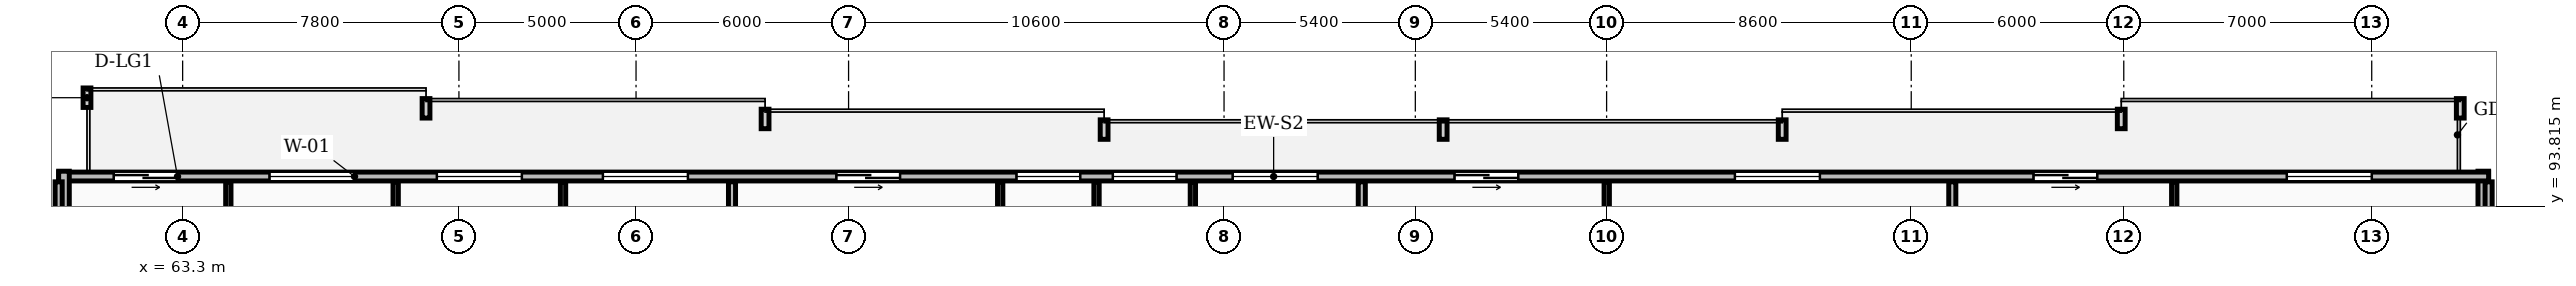
"""IFC4 building model, lengths in metres.
Left out: names, types, materials, properties, quantities, classifications, styles, units other than length and angle.
Written with IfcOpenShell. Run it as: python <this file> out.ifc"""

import sys

from ifc_helpers import new_model, si_unit, direction, frame, frame_2d, origin, place, context, subcontext, project, spatial, rectangle, extrude, element, fill, save


model = new_model("IFC4")
c1 = context("Model", 3, precision=1e-05, world=origin(), true_north=direction((0.0, 1.0)))
c2 = subcontext(c1, "Body", "Model", "MODEL_VIEW")
j1 = project(units=[si_unit("LENGTHUNIT", "METRE"), si_unit("PLANEANGLEUNIT", "RADIAN")], contexts=[c1])
p1 = place(None, origin())
s1 = spatial("IfcSite", under=j1, at=p1, CompositionType="ELEMENT")
p2 = place(p1, origin())
s2 = spatial("IfcBuilding", under=s1, at=p2, CompositionType="ELEMENT")
p3 = place(p2, frame((0.0, 0.0, 256.25)))
s3 = spatial("IfcBuildingStorey", under=s2, at=p3, CompositionType="ELEMENT", Elevation=256.25)
p4 = place(p3, frame((128.25, 91.2, 0.0), z_axis=(0.0, 0.0, 1.0), x_axis=(0.0, 1.0, 0.0)))
e1 = element("IfcWall", 1, at=p4, inside=s3, PredefinedType="STANDARD", context=c2, shape_type="SweptSolid", body=[
    extrude(rectangle(XDim=3.6, YDim=0.3, at=frame_2d((1.8, 0.0))), origin(), (0.0, 0.0, 1.0), 3.17),
])
p5 = place(p3, frame((128.4, 94.65, 0.0), z_axis=(0.0, 0.0, 1.0), x_axis=(-1.0, 0.0, 0.0)))
e2 = element("IfcWall", 2, at=p5, inside=s3, PredefinedType="STANDARD", context=c2, shape_type="SweptSolid", body=[
    extrude(rectangle(XDim=68.6, YDim=0.25, at=frame_2d((34.3, 0.0))), origin(), (0.0, 0.0, 1.0), 3.17),
])
p6 = place(p5, frame((60.248, 0.0, 0.85)))
e3 = element("IfcOpeningElement", 3, at=p6, cuts=e2, PredefinedType="OPENING", context=c2, shape_type="SweptSolid", body=[
    extrude(rectangle(XDim=2.4, YDim=1.9, at=frame_2d((1.2, 0.95))), frame((0.0, 0.135, 0.0), z_axis=(0.0, -1.0, 0.0), x_axis=(1.0, 0.0, 0.0)), (0.0, 0.0, 1.0), 0.27),
])
p7 = place(p5, frame((55.523, 0.0, 0.85)))
e4 = element("IfcOpeningElement", 4, at=p7, cuts=e2, PredefinedType="OPENING", context=c2, shape_type="SweptSolid", body=[
    extrude(rectangle(XDim=2.4, YDim=1.9, at=frame_2d((1.2, 0.95))), frame((0.0, 0.135, 0.0), z_axis=(0.0, -1.0, 0.0), x_axis=(1.0, 0.0, 0.0)), (0.0, 0.0, 1.0), 0.27),
])
p8 = place(p5, frame((65.245, 0.0, 0.0)))
e5 = element("IfcOpeningElement", 5, at=p8, cuts=e2, PredefinedType="OPENING", context=c2, shape_type="SweptSolid", body=[
    extrude(rectangle(XDim=1.8, YDim=2.2, at=frame_2d((0.9, 1.1))), frame((0.0, 0.135, 0.0), z_axis=(0.0, -1.0, 0.0), x_axis=(1.0, 0.0, 0.0)), (0.0, 0.0, 1.0), 0.27),
])
p9 = place(p5, frame((50.836, 0.0, 0.85)))
e6 = element("IfcOpeningElement", 6, at=p9, cuts=e2, PredefinedType="OPENING", context=c2, shape_type="SweptSolid", body=[
    extrude(rectangle(XDim=2.4, YDim=1.9, at=frame_2d((1.2, 0.95))), frame((0.0, 0.135, 0.0), z_axis=(0.0, -1.0, 0.0), x_axis=(1.0, 0.0, 0.0)), (0.0, 0.0, 1.0), 0.27),
])
p10 = place(p5, frame((39.76, 0.0, 0.85)))
e7 = element("IfcOpeningElement", 7, at=p10, cuts=e2, PredefinedType="OPENING", context=c2, shape_type="SweptSolid", body=[
    extrude(rectangle(XDim=1.8, YDim=1.8, at=frame_2d((0.9, 0.9))), frame((0.0, 0.135, 0.0), z_axis=(0.0, -1.0, 0.0), x_axis=(1.0, 0.0, 0.0)), (0.0, 0.0, 1.0), 0.27),
])
p11 = place(p5, frame((37.04, 0.0, 0.85)))
e8 = element("IfcOpeningElement", 8, at=p11, cuts=e2, PredefinedType="OPENING", context=c2, shape_type="SweptSolid", body=[
    extrude(rectangle(XDim=1.8, YDim=1.8, at=frame_2d((0.9, 0.9))), frame((0.0, 0.135, 0.0), z_axis=(0.0, -1.0, 0.0), x_axis=(1.0, 0.0, 0.0)), (0.0, 0.0, 1.0), 0.27),
])
p12 = place(p5, frame((44.845, 0.0, 0.0)))
e9 = element("IfcOpeningElement", 9, at=p12, cuts=e2, PredefinedType="OPENING", context=c2, shape_type="SweptSolid", body=[
    extrude(rectangle(XDim=1.8, YDim=2.2, at=frame_2d((0.9, 1.1))), frame((0.0, 0.135, 0.0), z_axis=(0.0, -1.0, 0.0), x_axis=(1.0, 0.0, 0.0)), (0.0, 0.0, 1.0), 0.27),
])
p13 = place(p5, frame((33.056, 0.0, 0.85)))
e10 = element("IfcOpeningElement", 10, at=p13, cuts=e2, PredefinedType="OPENING", context=c2, shape_type="SweptSolid", body=[
    extrude(rectangle(XDim=2.4, YDim=1.9, at=frame_2d((1.2, 0.95))), frame((0.0, 0.135, 0.0), z_axis=(0.0, -1.0, 0.0), x_axis=(1.0, 0.0, 0.0)), (0.0, 0.0, 1.0), 0.27),
])
p14 = place(p5, frame((27.394, 0.0, 0.0)))
e11 = element("IfcOpeningElement", 11, at=p14, cuts=e2, PredefinedType="OPENING", context=c2, shape_type="SweptSolid", body=[
    extrude(rectangle(XDim=1.8, YDim=2.2, at=frame_2d((0.9, 1.1))), frame((0.0, 0.135, 0.0), z_axis=(0.0, -1.0, 0.0), x_axis=(1.0, 0.0, 0.0)), (0.0, 0.0, 1.0), 0.27),
])
p15 = place(p5, frame((18.879, 0.0, 0.85)))
e12 = element("IfcOpeningElement", 12, at=p15, cuts=e2, PredefinedType="OPENING", context=c2, shape_type="SweptSolid", body=[
    extrude(rectangle(XDim=2.4, YDim=1.9, at=frame_2d((1.2, 0.95))), frame((0.0, 0.135, 0.0), z_axis=(0.0, -1.0, 0.0), x_axis=(1.0, 0.0, 0.0)), (0.0, 0.0, 1.0), 0.27),
])
p16 = place(p5, frame((11.048, 0.0, 0.0)))
e13 = element("IfcOpeningElement", 13, at=p16, cuts=e2, PredefinedType="OPENING", context=c2, shape_type="SweptSolid", body=[
    extrude(rectangle(XDim=1.8, YDim=2.2, at=frame_2d((0.9, 1.1))), frame((0.0, 0.135, 0.0), z_axis=(0.0, -1.0, 0.0), x_axis=(1.0, 0.0, 0.0)), (0.0, 0.0, 1.0), 0.27),
])
p17 = place(p5, frame((3.298, 0.0, 0.85)))
e14 = element("IfcOpeningElement", 14, at=p17, cuts=e2, PredefinedType="OPENING", context=c2, shape_type="SweptSolid", body=[
    extrude(rectangle(XDim=2.4, YDim=1.9, at=frame_2d((1.2, 0.95))), frame((0.0, 0.135, 0.0), z_axis=(0.0, -1.0, 0.0), x_axis=(1.0, 0.0, 0.0)), (0.0, 0.0, 1.0), 0.27),
])
p18 = place(p3, frame((59.95, 94.8, 0.0), z_axis=(0.0, 0.0, 1.0), x_axis=(0.0, -1.0, 0.0)))
e15 = element("IfcWall", 15, at=p18, inside=s3, PredefinedType="STANDARD", context=c2, shape_type="SweptSolid", body=[
    extrude(rectangle(XDim=3.6, YDim=0.3, at=frame_2d((1.8, 0.0))), origin(), (0.0, 0.0, 1.0), 3.17),
])
for number, where, z_axis, x_axis in (
    (16, (59.8, 70.18, 0.0), (0.0, 0.0, 1.0), (0.0, 1.0, 0.0)),
    (17, (128.4, 70.18, 0.0), (0.0, 0.0, 1.0), (0.0, 1.0, 0.0)),
):
    element("IfcWall", number, at=place(p3, frame(where, z_axis=z_axis, x_axis=x_axis)), inside=s3, PredefinedType="PARTITIONING", context=c2, shape_type="SweptSolid", body=[
        extrude(rectangle(XDim=24.32, YDim=0.2, at=frame_2d((12.16, 0.0))), origin(), (0.0, 0.0, 1.0), 2.477),
    ])
p19 = place(p3, frame((78.809, 70.18, 0.0), z_axis=(0.0, 0.0, 1.0), x_axis=(0.0, 1.0, 0.0)))
e18 = element("IfcWall", 18, at=p19, inside=s3, PredefinedType="PARTITIONING", context=c2, shape_type="SweptSolid", body=[
    extrude(rectangle(XDim=24.32, YDim=0.2, at=frame_2d((12.16, 0.0))), origin(), (0.0, 0.0, 1.0), 3.17),
])
p20 = place(p3, frame((69.314, 90.03, 0.0), z_axis=(0.0, 0.0, 1.0), x_axis=(0.0, 1.0, 0.0)))
e19 = element("IfcWall", 19, at=p20, inside=s3, PredefinedType="PARTITIONING", context=c2, shape_type="SweptSolid", body=[
    extrude(rectangle(XDim=4.47, YDim=0.15, at=frame_2d((2.235, 0.0))), origin(), (0.0, 0.0, 1.0), 3.17),
])
p21 = place(p3, frame((64.59, 84.89, 0.0), z_axis=(0.0, 0.0, 1.0), x_axis=(0.0, 1.0, 0.0)))
e20 = element("IfcWall", 20, at=p21, inside=s3, PredefinedType="PARTITIONING", context=c2, shape_type="SweptSolid", body=[
    extrude(rectangle(XDim=9.61, YDim=0.15, at=frame_2d((4.805, 0.0))), origin(), (0.0, 0.0, 1.0), 3.17),
])
p22 = place(p21, frame((3.82, 0.0, 0.0)))
e21 = element("IfcOpeningElement", 21, at=p22, cuts=e20, PredefinedType="OPENING", context=c2, shape_type="SweptSolid", body=[
    extrude(rectangle(XDim=0.92, YDim=2.08, at=frame_2d((0.46, 1.04))), frame((0.0, 0.085, 0.0), z_axis=(0.0, -1.0, 0.0), x_axis=(1.0, 0.0, 0.0)), (0.0, 0.0, 1.0), 0.17),
])
p23 = place(p3, frame((74.039, 87.51, 0.0), z_axis=(0.0, 0.0, 1.0), x_axis=(0.0, 1.0, 0.0)))
e22 = element("IfcWall", 22, at=p23, inside=s3, PredefinedType="PARTITIONING", context=c2, shape_type="SweptSolid", body=[
    extrude(rectangle(XDim=6.99, YDim=0.15, at=frame_2d((3.495, 0.0))), origin(), (0.0, 0.0, 1.0), 3.17),
])
p24 = place(p23, frame((1.2, 0.0, 0.0)))
e23 = element("IfcOpeningElement", 23, at=p24, cuts=e22, PredefinedType="OPENING", context=c2, shape_type="SweptSolid", body=[
    extrude(rectangle(XDim=0.92, YDim=2.08, at=frame_2d((0.46, 1.04))), frame((0.0, 0.085, 0.0), z_axis=(0.0, -1.0, 0.0), x_axis=(1.0, 0.0, 0.0)), (0.0, 0.0, 1.0), 0.17),
])
p25 = place(p3, frame((96.589, 70.18, 0.0), z_axis=(0.0, 0.0, 1.0), x_axis=(0.0, 1.0, 0.0)))
e24 = element("IfcWall", 24, at=p25, inside=s3, PredefinedType="PARTITIONING", context=c2, shape_type="SweptSolid", body=[
    extrude(rectangle(XDim=24.32, YDim=0.2, at=frame_2d((12.16, 0.0))), origin(), (0.0, 0.0, 1.0), 3.17),
])
p26 = place(p3, frame((89.1, 90.03, 0.0), z_axis=(0.0, 0.0, 1.0), x_axis=(0.0, 1.0, 0.0)))
e25 = element("IfcWall", 25, at=p26, inside=s3, PredefinedType="PARTITIONING", context=c2, shape_type="SweptSolid", body=[
    extrude(rectangle(XDim=4.47, YDim=0.15, at=frame_2d((2.235, 0.0))), origin(), (0.0, 0.0, 1.0), 3.17),
])
p27 = place(p3, frame((86.38, 84.89, 0.0), z_axis=(0.0, 0.0, 1.0), x_axis=(0.0, 1.0, 0.0)))
e26 = element("IfcWall", 26, at=p27, inside=s3, PredefinedType="PARTITIONING", context=c2, shape_type="SweptSolid", body=[
    extrude(rectangle(XDim=9.61, YDim=0.15, at=frame_2d((4.805, 0.0))), origin(), (0.0, 0.0, 1.0), 3.17),
])
p28 = place(p27, frame((3.82, 0.0, 0.0)))
e27 = element("IfcOpeningElement", 27, at=p28, cuts=e26, PredefinedType="OPENING", context=c2, shape_type="SweptSolid", body=[
    extrude(rectangle(XDim=0.92, YDim=2.08, at=frame_2d((0.46, 1.04))), frame((0.0, 0.085, 0.0), z_axis=(0.0, -1.0, 0.0), x_axis=(1.0, 0.0, 0.0)), (0.0, 0.0, 1.0), 0.17),
])
p29 = place(p3, frame((91.82, 87.4, 0.0), z_axis=(0.0, 0.0, 1.0), x_axis=(0.0, 1.0, 0.0)))
e28 = element("IfcWall", 28, at=p29, inside=s3, PredefinedType="PARTITIONING", context=c2, shape_type="SweptSolid", body=[
    extrude(rectangle(XDim=7.1, YDim=0.15, at=frame_2d((3.55, 0.0))), origin(), (0.0, 0.0, 1.0), 3.17),
])
p30 = place(p29, frame((1.31, 0.0, 0.0)))
e29 = element("IfcOpeningElement", 29, at=p30, cuts=e28, PredefinedType="OPENING", context=c2, shape_type="SweptSolid", body=[
    extrude(rectangle(XDim=0.92, YDim=2.08, at=frame_2d((0.46, 1.04))), frame((0.0, 0.085, 0.0), z_axis=(0.0, -1.0, 0.0), x_axis=(1.0, 0.0, 0.0)), (0.0, 0.0, 1.0), 0.17),
])
p31 = place(p3, frame((113.259, 70.18, 0.0), z_axis=(0.0, 0.0, 1.0), x_axis=(0.0, 1.0, 0.0)))
e30 = element("IfcWall", 30, at=p31, inside=s3, PredefinedType="PARTITIONING", context=c2, shape_type="SweptSolid", body=[
    extrude(rectangle(XDim=24.32, YDim=0.2, at=frame_2d((12.16, 0.0))), origin(), (0.0, 0.0, 1.0), 3.17),
])
for number, where, z_axis, x_axis in (
    (31, (103.504, 90.03, 0.0), (0.0, 0.0, 1.0), (0.0, 1.0, 0.0)),
    (32, (119.524, 90.03, 0.0), (0.0, 0.0, 1.0), (0.0, 1.0, 0.0)),
):
    element("IfcWall", number, at=place(p3, frame(where, z_axis=z_axis, x_axis=x_axis)), inside=s3, PredefinedType="PARTITIONING", context=c2, shape_type="SweptSolid", body=[
        extrude(rectangle(XDim=4.47, YDim=0.15, at=frame_2d((2.235, 0.0))), origin(), (0.0, 0.0, 1.0), 3.17),
    ])
p32 = place(p6, origin())
e33 = element("IfcWindow", 33, at=p32, inside=s3, PartitioningType="DOUBLE_PANEL_VERTICAL", PredefinedType="WINDOW", context=c2, shape_type="SweptSolid", body=[
    extrude(rectangle(XDim=2.4, YDim=1.9, at=frame_2d((1.2, 0.95))), frame((0.0, 0.03, 0.0), z_axis=(0.0, -1.0, 0.0), x_axis=(1.0, 0.0, 0.0)), (0.0, 0.0, 1.0), 0.06),
])
fill(e3, e33)
p33 = place(p7, origin())
e34 = element("IfcWindow", 34, at=p33, inside=s3, PartitioningType="DOUBLE_PANEL_VERTICAL", PredefinedType="WINDOW", context=c2, shape_type="SweptSolid", body=[
    extrude(rectangle(XDim=2.4, YDim=1.9, at=frame_2d((1.2, 0.95))), frame((0.0, 0.03, 0.0), z_axis=(0.0, -1.0, 0.0), x_axis=(1.0, 0.0, 0.0)), (0.0, 0.0, 1.0), 0.06),
])
fill(e4, e34)
p34 = place(p8, origin())
e35 = element("IfcDoor", 35, at=p34, inside=s3, OperationType="SLIDING_TO_LEFT", PredefinedType="DOOR", context=c2, shape_type="SweptSolid", body=[
    extrude(rectangle(XDim=1.8, YDim=2.2, at=frame_2d((0.9, 1.1))), frame((0.0, 0.025, 0.0), z_axis=(0.0, -1.0, 0.0), x_axis=(1.0, 0.0, 0.0)), (0.0, 0.0, 1.0), 0.05),
])
fill(e5, e35)
p35 = place(p9, origin())
e36 = element("IfcWindow", 36, at=p35, inside=s3, PartitioningType="DOUBLE_PANEL_VERTICAL", PredefinedType="WINDOW", context=c2, shape_type="SweptSolid", body=[
    extrude(rectangle(XDim=2.4, YDim=1.9, at=frame_2d((1.2, 0.95))), frame((0.0, 0.03, 0.0), z_axis=(0.0, -1.0, 0.0), x_axis=(1.0, 0.0, 0.0)), (0.0, 0.0, 1.0), 0.06),
])
fill(e6, e36)
p36 = place(p10, origin())
e37 = element("IfcWindow", 37, at=p36, inside=s3, PartitioningType="SINGLE_PANEL", PredefinedType="WINDOW", context=c2, shape_type="SweptSolid", body=[
    extrude(rectangle(XDim=1.8, YDim=1.8, at=frame_2d((0.9, 0.9))), frame((0.0, 0.03, 0.0), z_axis=(0.0, -1.0, 0.0), x_axis=(1.0, 0.0, 0.0)), (0.0, 0.0, 1.0), 0.06),
])
fill(e7, e37)
p37 = place(p11, origin())
e38 = element("IfcWindow", 38, at=p37, inside=s3, PartitioningType="SINGLE_PANEL", PredefinedType="WINDOW", context=c2, shape_type="SweptSolid", body=[
    extrude(rectangle(XDim=1.8, YDim=1.8, at=frame_2d((0.9, 0.9))), frame((0.0, 0.03, 0.0), z_axis=(0.0, -1.0, 0.0), x_axis=(1.0, 0.0, 0.0)), (0.0, 0.0, 1.0), 0.06),
])
fill(e8, e38)
p38 = place(p12, origin())
e39 = element("IfcDoor", 39, at=p38, inside=s3, OperationType="SLIDING_TO_LEFT", PredefinedType="DOOR", context=c2, shape_type="SweptSolid", body=[
    extrude(rectangle(XDim=1.8, YDim=2.2, at=frame_2d((0.9, 1.1))), frame((0.0, 0.025, 0.0), z_axis=(0.0, -1.0, 0.0), x_axis=(1.0, 0.0, 0.0)), (0.0, 0.0, 1.0), 0.05),
])
fill(e9, e39)
p39 = place(p13, origin())
e40 = element("IfcWindow", 40, at=p39, inside=s3, PartitioningType="DOUBLE_PANEL_VERTICAL", PredefinedType="WINDOW", context=c2, shape_type="SweptSolid", body=[
    extrude(rectangle(XDim=2.4, YDim=1.9, at=frame_2d((1.2, 0.95))), frame((0.0, 0.03, 0.0), z_axis=(0.0, -1.0, 0.0), x_axis=(1.0, 0.0, 0.0)), (0.0, 0.0, 1.0), 0.06),
])
fill(e10, e40)
p40 = place(p14, origin())
e41 = element("IfcDoor", 41, at=p40, inside=s3, OperationType="SLIDING_TO_LEFT", PredefinedType="DOOR", context=c2, shape_type="SweptSolid", body=[
    extrude(rectangle(XDim=1.8, YDim=2.2, at=frame_2d((0.9, 1.1))), frame((0.0, 0.025, 0.0), z_axis=(0.0, -1.0, 0.0), x_axis=(1.0, 0.0, 0.0)), (0.0, 0.0, 1.0), 0.05),
])
fill(e11, e41)
p41 = place(p15, origin())
e42 = element("IfcWindow", 42, at=p41, inside=s3, PartitioningType="DOUBLE_PANEL_VERTICAL", PredefinedType="WINDOW", context=c2, shape_type="SweptSolid", body=[
    extrude(rectangle(XDim=2.4, YDim=1.9, at=frame_2d((1.2, 0.95))), frame((0.0, 0.03, 0.0), z_axis=(0.0, -1.0, 0.0), x_axis=(1.0, 0.0, 0.0)), (0.0, 0.0, 1.0), 0.06),
])
fill(e12, e42)
p42 = place(p16, origin())
e43 = element("IfcDoor", 43, at=p42, inside=s3, OperationType="SLIDING_TO_LEFT", PredefinedType="DOOR", context=c2, shape_type="SweptSolid", body=[
    extrude(rectangle(XDim=1.8, YDim=2.2, at=frame_2d((0.9, 1.1))), frame((0.0, 0.025, 0.0), z_axis=(0.0, -1.0, 0.0), x_axis=(1.0, 0.0, 0.0)), (0.0, 0.0, 1.0), 0.05),
])
fill(e13, e43)
p43 = place(p17, origin())
e44 = element("IfcWindow", 44, at=p43, inside=s3, PartitioningType="DOUBLE_PANEL_VERTICAL", PredefinedType="WINDOW", context=c2, shape_type="SweptSolid", body=[
    extrude(rectangle(XDim=2.4, YDim=1.9, at=frame_2d((1.2, 0.95))), frame((0.0, 0.03, 0.0), z_axis=(0.0, -1.0, 0.0), x_axis=(1.0, 0.0, 0.0)), (0.0, 0.0, 1.0), 0.06),
])
fill(e14, e44)
save(model, sys.argv[1])
